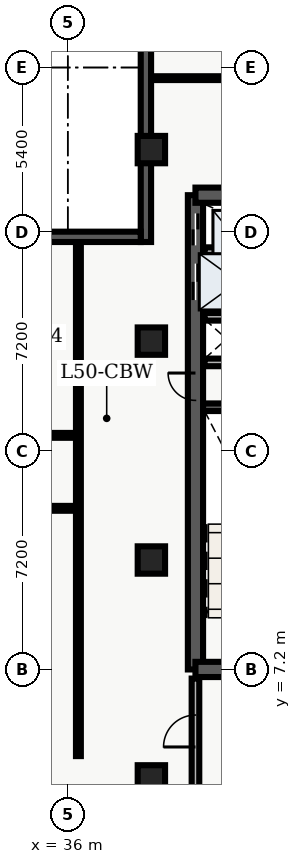
"""IFC4 building model, lengths in metres.
Left out: names, types, materials, properties, quantities, classifications, styles, units other than length and angle.
Written with IfcOpenShell. Run it as: python <this file> out.ifc"""

import sys

from ifc_helpers import new_model, entity, si_unit, converted_unit, direction, frame, origin_with_axes, origin_2d_with_axis, place, context, subcontext, project, spatial, polyline, rectangle, outline, extrude, element, fill, save


model = new_model("IFC4")
c1 = context("Model", 3, precision=1e-05, world=origin_with_axes(), true_north=direction((0.0, 1.0)))
c2 = subcontext(c1, "Body", "Model", "MODEL_VIEW")
j1 = project(units=[si_unit("LENGTHUNIT", "METRE"), converted_unit("PLANEANGLEUNIT", "DEGREE", entity("IfcPlaneAngleMeasure", 0.017), si_unit("PLANEANGLEUNIT", "RADIAN"), dimensions=[0, 0, 0, 0, 0, 0, 0])], contexts=[c1])
p1 = place(None, origin_with_axes())
s1 = spatial("IfcSite", under=j1, at=p1, CompositionType="ELEMENT")
p2 = place(p1, origin_with_axes())
s2 = spatial("IfcBuilding", under=s1, at=p2, CompositionType="ELEMENT")
p3 = place(p2, frame((0.0, 0.0, 204.3), z_axis=(0.0, 0.0, 1.0), x_axis=(1.0, 0.0, 0.0)))
s3 = spatial("IfcBuildingStorey", under=s2, at=p3, CompositionType="ELEMENT", Elevation=204.3)
p4 = place(p3, frame((40.2, 7.2, 0.0), z_axis=(0.0, 0.0, 1.0), x_axis=(0.0, 1.0, 0.0)))
e1 = element("IfcWall", 1, at=p4, inside=s3, PredefinedType="SHEAR", context=c2, shape_type="SweptSolid", body=[
    extrude(outline(polyline([(0.0, -0.25), (15.6, -0.25), (15.6, 0.25), (0.0, 0.25), (0.0, -0.25)])), origin_with_axes(), (0.0, 0.0, 1.0), 3.66),
])
p5 = place(p4, frame((14.475, 0.0, 0.0), z_axis=(0.0, 0.0, 1.0), x_axis=(1.0, 0.0, 0.0)))
e2 = element("IfcOpeningElement", 2, at=p5, cuts=e1, PredefinedType="OPENING", context=c2, shape_type="SweptSolid", body=[
    extrude(rectangle(XDim=1.05, YDim=0.52, at=origin_2d_with_axis()), origin_with_axes(), (0.0, 0.0, 1.0), 2.15),
])
p6 = place(p4, frame((12.75, 0.0, 0.0), z_axis=(0.0, 0.0, 1.0), x_axis=(1.0, 0.0, 0.0)))
e3 = element("IfcOpeningElement", 3, at=p6, cuts=e1, PredefinedType="OPENING", context=c2, shape_type="SweptSolid", body=[
    extrude(rectangle(XDim=1.2, YDim=0.52, at=origin_2d_with_axis()), origin_with_axes(), (0.0, 0.0, 1.0), 2.15),
])
p7 = place(p4, frame((9.3, 0.0, 0.0), z_axis=(0.0, 0.0, 1.0), x_axis=(1.0, 0.0, 0.0)))
e4 = element("IfcOpeningElement", 4, at=p7, cuts=e1, PredefinedType="OPENING", context=c2, shape_type="SweptSolid", body=[
    extrude(rectangle(XDim=0.9, YDim=0.52, at=origin_2d_with_axis()), origin_with_axes(), (0.0, 0.0, 1.0), 2.15),
])
p8 = place(p3, frame((40.2, 7.2, 0.0), z_axis=(0.0, 0.0, 1.0), x_axis=(1.0, 0.0, 0.0)))
e5 = element("IfcWall", 5, at=p8, inside=s3, PredefinedType="SHEAR", context=c2, shape_type="SweptSolid", body=[
    extrude(outline(polyline([(0.0, -0.25), (7.85, -0.25), (7.85, 0.25), (0.0, 0.25), (0.0, -0.25)])), origin_with_axes(), (0.0, 0.0, 1.0), 3.66),
])
p9 = place(p8, frame((2.175, 0.0, 0.0), z_axis=(0.0, 0.0, 1.0), x_axis=(1.0, 0.0, 0.0)))
e6 = element("IfcOpeningElement", 6, at=p9, cuts=e5, PredefinedType="OPENING", context=c2, shape_type="SweptSolid", body=[
    extrude(rectangle(XDim=1.05, YDim=0.52, at=origin_2d_with_axis()), origin_with_axes(), (0.0, 0.0, 1.0), 2.15),
])
p10 = place(p3, frame((40.2, 22.8, 0.0), z_axis=(0.0, 0.0, 1.0), x_axis=(1.0, 0.0, 0.0)))
e7 = element("IfcWall", 7, at=p10, inside=s3, PredefinedType="SHEAR", context=c2, shape_type="SweptSolid", body=[
    extrude(outline(polyline([(0.0, -0.25), (7.85, -0.25), (7.85, 0.25), (0.0, 0.25), (0.0, -0.25)])), origin_with_axes(), (0.0, 0.0, 1.0), 3.66),
])
p11 = place(p10, frame((5.775, 0.0, 0.0), z_axis=(0.0, 0.0, 1.0), x_axis=(1.0, 0.0, 0.0)))
e8 = element("IfcOpeningElement", 8, at=p11, cuts=e7, PredefinedType="OPENING", context=c2, shape_type="SweptSolid", body=[
    extrude(rectangle(XDim=1.05, YDim=0.52, at=origin_2d_with_axis()), origin_with_axes(), (0.0, 0.0, 1.0), 2.15),
])
p12 = place(p3, frame((40.45, 15.825, 0.0), z_axis=(0.0, 0.0, 1.0), x_axis=(1.0, 0.0, 0.0)))
e9 = element("IfcWall", 9, at=p12, inside=s3, PredefinedType="SHEAR", context=c2, shape_type="SweptSolid", body=[
    extrude(outline(polyline([(0.0, -0.125), (3.55, -0.125), (3.55, 0.125), (0.0, 0.125), (0.0, -0.125)])), origin_with_axes(), (0.0, 0.0, 1.0), 3.66),
])
p13 = place(p3, frame((40.5, 17.3, 0.0), z_axis=(0.0, 0.0, 1.0), x_axis=(1.0, 0.0, 0.0)))
e10 = element("IfcWall", 10, at=p13, inside=s3, PredefinedType="SOLIDWALL", context=c2, shape_type="SweptSolid", body=[
    extrude(outline(polyline([(0.0, -0.125), (3.5, -0.125), (3.5, 0.125), (0.0, 0.125), (0.0, -0.125)])), origin_with_axes(), (0.0, 0.0, 1.0), 2.7),
])
p14 = place(p13, frame((2.4, 0.0, 0.0), z_axis=(0.0, 0.0, 1.0), x_axis=(1.0, 0.0, 0.0)))
e11 = element("IfcOpeningElement", 11, at=p14, cuts=e10, PredefinedType="OPENING", context=c2, shape_type="SweptSolid", body=[
    extrude(rectangle(XDim=0.9, YDim=0.27, at=origin_2d_with_axis()), origin_with_axes(), (0.0, 0.0, 1.0), 2.15),
])
p15 = place(p3, frame((40.5, 18.8, 0.0), z_axis=(0.0, 0.0, 1.0), x_axis=(1.0, 0.0, 0.0)))
e12 = element("IfcWall", 12, at=p15, inside=s3, PredefinedType="SOLIDWALL", context=c2, shape_type="SweptSolid", body=[
    extrude(outline(polyline([(0.0, -0.125), (3.5, -0.125), (3.5, 0.125), (0.0, 0.125), (0.0, -0.125)])), origin_with_axes(), (0.0, 0.0, 1.0), 2.7),
])
p16 = place(p3, frame((40.2, 3.1, 0.0), z_axis=(0.0, 0.0, 1.0), x_axis=(0.0, 1.0, 0.0)))
e13 = element("IfcWall", 13, at=p16, inside=s3, PredefinedType="SOLIDWALL", context=c2, shape_type="SweptSolid", body=[
    extrude(outline(polyline([(0.0, -0.125), (3.8, -0.125), (3.8, 0.125), (0.0, 0.125), (0.0, -0.125)])), origin_with_axes(), (0.0, 0.0, 1.0), 2.7),
])
p17 = place(p16, frame((2.075, 0.0, 0.0), z_axis=(0.0, 0.0, 1.0), x_axis=(1.0, 0.0, 0.0)))
e14 = element("IfcOpeningElement", 14, at=p17, cuts=e13, PredefinedType="OPENING", context=c2, shape_type="SweptSolid", body=[
    extrude(rectangle(XDim=1.05, YDim=0.27, at=origin_2d_with_axis()), origin_with_axes(), (0.0, 0.0, 1.0), 2.15),
])
for number, where, z_axis, x_axis in (
    (15, (38.75, 3.6, 0.0), (0.0, 0.0, 1.0), (1.0, 0.0, 0.0)),
    (16, (38.75, 10.8, 0.0), (0.0, 0.0, 1.0), (1.0, 0.0, 0.0)),
    (17, (38.75, 18.0, 0.0), (0.0, 0.0, 1.0), (1.0, 0.0, 0.0)),
    (18, (38.75, 24.3, 0.0), (0.0, 0.0, 1.0), (1.0, 0.0, 0.0)),
):
    element("IfcColumn", number, at=place(p3, frame(where, z_axis=z_axis, x_axis=x_axis)), inside=s3, PredefinedType="COLUMN", context=c2, shape_type="SweptSolid", body=[
        extrude(rectangle(XDim=0.9, YDim=0.9, at=origin_2d_with_axis()), origin_with_axes(), (0.0, 0.0, 1.0), 3.9),
    ])
p18 = place(p3, frame((40.5, 20.96, 0.0), z_axis=(0.0, 0.0, 1.0), x_axis=(1.0, 0.0, 0.0)))
e19 = element("IfcWall", 19, at=p18, inside=s3, PredefinedType="SOLIDWALL", context=c2, shape_type="SweptSolid", body=[
    extrude(outline(polyline([(0.0, -0.125), (3.5, -0.125), (3.5, 0.125), (0.0, 0.125), (0.0, -0.125)])), origin_with_axes(), (0.0, 0.0, 1.0), 2.7),
])
p19 = place(p3, frame((21.15, 12.5, 0.0), z_axis=(0.0, 0.0, 1.0), x_axis=(1.0, 0.0, 0.0)))
e20 = element("IfcWall", 20, at=p19, inside=s3, PredefinedType="PARTITIONING", context=c2, shape_type="SweptSolid", body=[
    extrude(outline(polyline([(0.0, -0.08), (15.2, -0.08), (15.2, 0.08), (0.0, 0.08), (0.0, -0.08)])), origin_with_axes(), (0.0, 0.0, 1.0), 2.7),
])
p20 = place(p19, frame((7.65, 0.0, 0.0), z_axis=(0.0, 0.0, 1.0), x_axis=(1.0, 0.0, 0.0)))
e21 = element("IfcOpeningElement", 21, at=p20, cuts=e20, PredefinedType="OPENING", context=c2, shape_type="SweptSolid", body=[
    extrude(rectangle(XDim=1.0, YDim=0.18, at=origin_2d_with_axis()), origin_with_axes(), (0.0, 0.0, 1.0), 2.15),
])
p21 = place(p3, frame((21.15, 14.9, 0.0), z_axis=(0.0, 0.0, 1.0), x_axis=(1.0, 0.0, 0.0)))
e22 = element("IfcWall", 22, at=p21, inside=s3, PredefinedType="PARTITIONING", context=c2, shape_type="SweptSolid", body=[
    extrude(outline(polyline([(0.0, -0.08), (15.2, -0.08), (15.2, 0.08), (0.0, 0.08), (0.0, -0.08)])), origin_with_axes(), (0.0, 0.0, 1.0), 2.7),
])
p22 = place(p21, frame((2.57, 0.0, 0.0), z_axis=(0.0, 0.0, 1.0), x_axis=(1.0, 0.0, 0.0)))
e23 = element("IfcOpeningElement", 23, at=p22, cuts=e22, PredefinedType="OPENING", context=c2, shape_type="SweptSolid", body=[
    extrude(rectangle(XDim=1.0, YDim=0.18, at=origin_2d_with_axis()), origin_with_axes(), (0.0, 0.0, 1.0), 2.15),
])
p23 = place(p21, frame((6.476, 0.0, 0.0), z_axis=(0.0, 0.0, 1.0), x_axis=(1.0, 0.0, 0.0)))
e24 = element("IfcOpeningElement", 24, at=p23, cuts=e22, PredefinedType="OPENING", context=c2, shape_type="SweptSolid", body=[
    extrude(rectangle(XDim=1.0, YDim=0.18, at=origin_2d_with_axis()), origin_with_axes(), (0.0, 0.0, 1.0), 2.15),
])
p24 = place(p21, frame((9.667, 0.0, 0.0), z_axis=(0.0, 0.0, 1.0), x_axis=(1.0, 0.0, 0.0)))
e25 = element("IfcOpeningElement", 25, at=p24, cuts=e22, PredefinedType="OPENING", context=c2, shape_type="SweptSolid", body=[
    extrude(rectangle(XDim=1.0, YDim=0.18, at=origin_2d_with_axis()), origin_with_axes(), (0.0, 0.0, 1.0), 2.15),
])
p25 = place(p21, frame((13.232, 0.0, 0.0), z_axis=(0.0, 0.0, 1.0), x_axis=(1.0, 0.0, 0.0)))
e26 = element("IfcOpeningElement", 26, at=p25, cuts=e22, PredefinedType="OPENING", context=c2, shape_type="SweptSolid", body=[
    extrude(rectangle(XDim=1.0, YDim=0.18, at=origin_2d_with_axis()), origin_with_axes(), (0.0, 0.0, 1.0), 2.15),
])
p26 = place(p3, frame((36.35, 4.35, 0.0), z_axis=(0.0, 0.0, 1.0), x_axis=(0.0, 1.0, 0.0)))
e27 = element("IfcWall", 27, at=p26, inside=s3, PredefinedType="PARTITIONING", context=c2, shape_type="SweptSolid", body=[
    extrude(outline(polyline([(0.0, -0.08), (16.95, -0.08), (16.95, 0.08), (0.0, 0.08), (0.0, -0.08)])), origin_with_axes(), (0.0, 0.0, 1.0), 2.7),
])
p27 = place(p3, frame((38.735, 26.65, 0.0), z_axis=(0.0, 0.0, 1.0), x_axis=(1.0, 0.0, 0.0)))
e28 = element("IfcWall", 28, at=p27, inside=s3, PredefinedType="PARTITIONING", context=c2, shape_type="SweptSolid", body=[
    extrude(outline(polyline([(0.0, -0.062), (20.905, -0.062), (20.905, 0.062), (0.0, 0.062), (0.0, -0.062)])), origin_with_axes(), (0.0, 0.0, 1.0), 2.7),
])
p28 = place(p27, frame((4.265, 0.0, 0.0), z_axis=(0.0, 0.0, 1.0), x_axis=(1.0, 0.0, 0.0)))
e29 = element("IfcOpeningElement", 29, at=p28, cuts=e28, PredefinedType="OPENING", context=c2, shape_type="SweptSolid", body=[
    extrude(rectangle(XDim=1.0, YDim=0.145, at=origin_2d_with_axis()), origin_with_axes(), (0.0, 0.0, 1.0), 2.15),
])
p29 = place(p3, frame((38.57, 21.26, 0.0), z_axis=(0.0, 0.0, 1.0), x_axis=(0.0, 1.0, 0.0)))
e30 = element("IfcWall", 30, at=p29, inside=s3, PredefinedType="SOLIDWALL", context=c2, shape_type="SweptSolid", body=[
    extrude(outline(polyline([(0.0, -0.17), (7.54, -0.17), (7.54, 0.17), (0.0, 0.17), (0.0, -0.17)])), origin_with_axes(), (0.0, 0.0, 1.0), 3.66),
])
p30 = place(p3, frame((29.541, 21.43, 0.0), z_axis=(0.0, 0.0, 1.0), x_axis=(1.0, 0.0, 0.0)))
e31 = element("IfcWall", 31, at=p30, inside=s3, PredefinedType="SOLIDWALL", context=c2, shape_type="SweptSolid", body=[
    extrude(outline(polyline([(0.0, -0.17), (8.859, -0.17), (8.859, 0.17), (0.0, 0.17), (0.0, -0.17)])), origin_with_axes(), (0.0, 0.0, 1.0), 3.66),
])
p31 = place(p30, frame((4.429, 0.0, 0.45), z_axis=(0.0, 0.0, 1.0), x_axis=(1.0, 0.0, 0.0)))
e32 = element("IfcOpeningElement", 32, at=p31, cuts=e31, PredefinedType="OPENING", context=c2, shape_type="SweptSolid", body=[
    extrude(rectangle(XDim=1.8, YDim=0.36, at=origin_2d_with_axis()), origin_with_axes(), (0.0, 0.0, 1.0), 2.1),
])
p32 = place(p4, frame((14.475, 0.0, 0.0), z_axis=(0.0, 0.0, 1.0), x_axis=(1.0, 0.0, 0.0)))
e33 = element("IfcDoor", 33, at=p32, inside=s3, OperationType="SLIDING_TO_RIGHT", PredefinedType="DOOR", context=c2, shape_type="SweptSolid", body=[
    extrude(rectangle(XDim=1.05, YDim=0.09, at=origin_2d_with_axis()), origin_with_axes(), (0.0, 0.0, 1.0), 2.15),
])
fill(e2, e33)
p33 = place(p4, frame((12.75, 0.0, 0.0), z_axis=(0.0, 0.0, 1.0), x_axis=(1.0, 0.0, 0.0)))
e34 = element("IfcDoor", 34, at=p33, inside=s3, OperationType="DOUBLE_DOOR_SLIDING", PredefinedType="DOOR", context=c2, shape_type="SweptSolid", body=[
    extrude(rectangle(XDim=1.2, YDim=0.09, at=origin_2d_with_axis()), origin_with_axes(), (0.0, 0.0, 1.0), 2.15),
])
fill(e3, e34)
p34 = place(p4, frame((9.3, 0.0, 0.0), z_axis=(0.0, 0.0, 1.0), x_axis=(1.0, 0.0, 0.0)))
e35 = element("IfcDoor", 35, at=p34, inside=s3, OperationType="SINGLE_SWING_RIGHT", PredefinedType="DOOR", context=c2, shape_type="SweptSolid", body=[
    extrude(rectangle(XDim=0.9, YDim=0.09, at=origin_2d_with_axis()), origin_with_axes(), (0.0, 0.0, 1.0), 2.15),
])
fill(e4, e35)
p35 = place(p16, frame((2.075, 0.0, 0.0), z_axis=(0.0, 0.0, 1.0), x_axis=(1.0, 0.0, 0.0)))
e36 = element("IfcDoor", 36, at=p35, inside=s3, OperationType="SINGLE_SWING_LEFT", PredefinedType="DOOR", context=c2, shape_type="SweptSolid", body=[
    extrude(rectangle(XDim=1.05, YDim=0.09, at=origin_2d_with_axis()), origin_with_axes(), (0.0, 0.0, 1.0), 2.15),
])
fill(e14, e36)
save(model, sys.argv[1])
